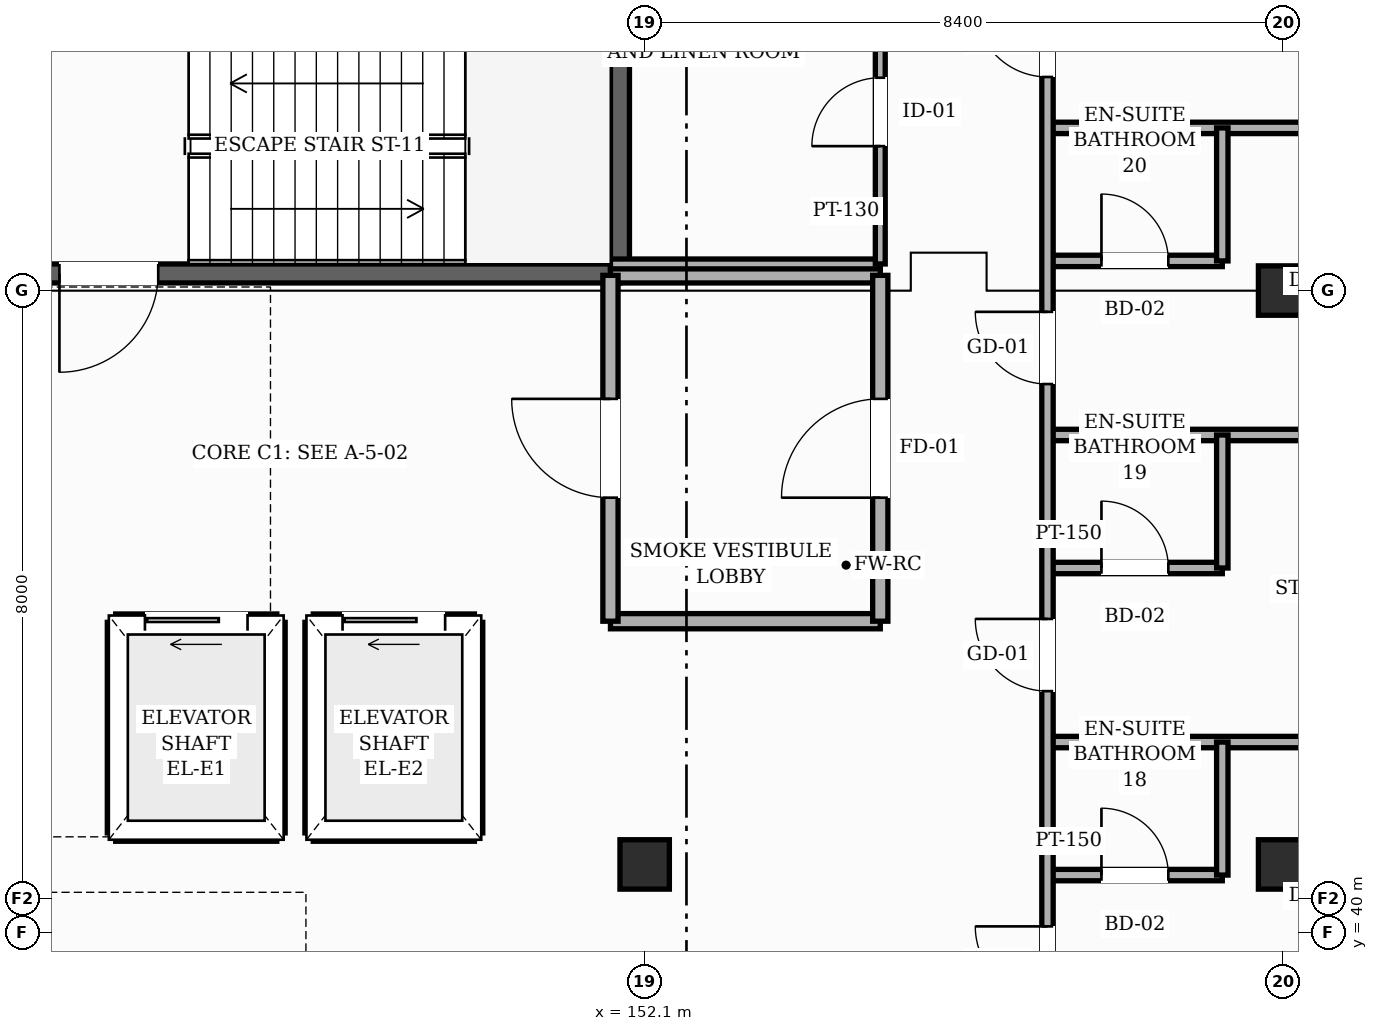
"""IFC4 building model, lengths in metres.
Left out: names, types, materials, properties, quantities, classifications, styles, units other than length and angle.
Written with IfcOpenShell. Run it as: python <this file> out.ifc"""

import sys

from ifc_helpers import new_model, si_unit, direction, frame, frame_2d, origin, origin_2d, place, context, subcontext, project, spatial, rectangle, hollow_rectangle, extrude, element, fill, save


model = new_model("IFC4")
c1 = context("Model", 3, precision=1e-05, world=origin(), true_north=direction((0.0, 1.0)))
c2 = subcontext(c1, "Body", "Model", "MODEL_VIEW")
j1 = project(units=[si_unit("LENGTHUNIT", "METRE"), si_unit("PLANEANGLEUNIT", "RADIAN")], contexts=[c1])
p1 = place(None, origin())
s1 = spatial("IfcSite", under=j1, at=p1, CompositionType="ELEMENT")
p2 = place(p1, origin())
s2 = spatial("IfcBuilding", under=s1, at=p2, CompositionType="ELEMENT")
p3 = place(p2, frame((0.0, 0.0, 15.0)))
s3 = spatial("IfcBuildingStorey", under=s2, at=p3, CompositionType="ELEMENT", Elevation=15.0)
for number, where, z_axis, x_axis in (
    (1, (152.1, 40.9, 0.0), (0.0, 0.0, 1.0), (1.0, 0.0, 0.0)),
    (2, (160.5, 40.9, 0.0), (0.0, 0.0, 1.0), (1.0, 0.0, 0.0)),
    (3, (160.5, 48.45, 0.0), (0.0, 0.0, 1.0), (1.0, 0.0, 0.0)),
):
    element("IfcColumn", number, at=place(p3, frame(where, z_axis=z_axis, x_axis=x_axis)), inside=s3, PredefinedType="COLUMN", context=c2, shape_type="SweptSolid", body=[
        extrude(hollow_rectangle(XDim=0.65, YDim=0.65, WallThickness=0.025, InnerFilletRadius=0.025, OuterFilletRadius=0.05, at=origin_2d()), origin(), (0.0, 0.0, 1.0), 4.8),
    ])
p4 = place(p3, frame((151.775, 52.025, 0.0), z_axis=(0.0, 0.0, 1.0), x_axis=(0.0, -1.0, 0.0)))
e4 = element("IfcWall", 4, at=p4, inside=s3, PredefinedType="SHEAR", context=c2, shape_type="SweptSolid", body=[
    extrude(rectangle(XDim=3.35, YDim=0.25, at=frame_2d((1.675, 0.0))), origin(), (0.0, 0.0, 1.0), 4.56),
])
p5 = place(p3, frame((151.775, 48.675, 0.0), z_axis=(0.0, 0.0, 1.0), x_axis=(-1.0, 0.0, 0.0)))
e5 = element("IfcWall", 5, at=p5, inside=s3, PredefinedType="SHEAR", context=c2, shape_type="SweptSolid", body=[
    extrude(rectangle(XDim=7.9, YDim=0.25, at=frame_2d((3.95, 0.0))), origin(), (0.0, 0.0, 1.0), 4.56),
])
p6 = place(p5, frame((6.075, 0.0, 0.0)))
e6 = element("IfcOpeningElement", 6, at=p6, cuts=e5, PredefinedType="OPENING", context=c2, shape_type="SweptSolid", body=[
    extrude(rectangle(XDim=1.3, YDim=2.2, at=frame_2d((0.65, 1.1))), frame((0.0, 0.135, 0.0), z_axis=(0.0, -1.0, 0.0), x_axis=(1.0, 0.0, 0.0)), (0.0, 0.0, 1.0), 0.27),
])
p7 = place(p3, frame((145.14, 44.085, 0.0), z_axis=(0.0, 0.0, 1.0), x_axis=(1.0, 0.0, 0.0)))
e7 = element("IfcWall", 7, at=p7, inside=s3, PredefinedType="SHEAR", context=c2, shape_type="SweptSolid", body=[
    extrude(rectangle(XDim=2.12, YDim=0.22, at=frame_2d((1.06, 0.0))), origin(), (0.0, 0.0, 1.0), 4.56),
])
p8 = place(p7, frame((0.385, 0.0, 0.0)))
e8 = element("IfcOpeningElement", 8, at=p8, cuts=e7, PredefinedType="OPENING", context=c2, shape_type="SweptSolid", body=[
    extrude(rectangle(XDim=1.35, YDim=2.3, at=frame_2d((0.675, 1.15))), frame((0.0, 0.12, 0.0), z_axis=(0.0, -1.0, 0.0), x_axis=(1.0, 0.0, 0.0)), (0.0, 0.0, 1.0), 0.24),
])
p9 = place(p3, frame((145.14, 41.315, 0.0), z_axis=(0.0, 0.0, 1.0), x_axis=(1.0, 0.0, 0.0)))
e9 = element("IfcWall", 9, at=p9, inside=s3, PredefinedType="SHEAR", context=c2, shape_type="SweptSolid", body=[
    extrude(rectangle(XDim=2.12, YDim=0.22, at=frame_2d((1.06, 0.0))), origin(), (0.0, 0.0, 1.0), 4.56),
])
for number, where, z_axis, x_axis in (
    (10, (147.26, 41.315, 0.0), (0.0, 0.0, 1.0), (0.0, 1.0, 0.0)),
    (11, (145.14, 41.315, 0.0), (0.0, 0.0, 1.0), (0.0, 1.0, 0.0)),
):
    element("IfcWall", number, at=place(p3, frame(where, z_axis=z_axis, x_axis=x_axis)), inside=s3, PredefinedType="SHEAR", context=c2, shape_type="SweptSolid", body=[
        extrude(rectangle(XDim=2.77, YDim=0.22, at=frame_2d((1.385, 0.0))), origin(), (0.0, 0.0, 1.0), 4.56),
    ])
p10 = place(p3, frame((147.74, 44.085, 0.0), z_axis=(0.0, 0.0, 1.0), x_axis=(1.0, 0.0, 0.0)))
e12 = element("IfcWall", 12, at=p10, inside=s3, PredefinedType="SHEAR", context=c2, shape_type="SweptSolid", body=[
    extrude(rectangle(XDim=2.12, YDim=0.22, at=frame_2d((1.06, 0.0))), origin(), (0.0, 0.0, 1.0), 4.56),
])
p11 = place(p10, frame((0.385, 0.0, 0.0)))
e13 = element("IfcOpeningElement", 13, at=p11, cuts=e12, PredefinedType="OPENING", context=c2, shape_type="SweptSolid", body=[
    extrude(rectangle(XDim=1.35, YDim=2.3, at=frame_2d((0.675, 1.15))), frame((0.0, 0.12, 0.0), z_axis=(0.0, -1.0, 0.0), x_axis=(1.0, 0.0, 0.0)), (0.0, 0.0, 1.0), 0.24),
])
p12 = place(p3, frame((147.74, 41.315, 0.0), z_axis=(0.0, 0.0, 1.0), x_axis=(1.0, 0.0, 0.0)))
e14 = element("IfcWall", 14, at=p12, inside=s3, PredefinedType="SHEAR", context=c2, shape_type="SweptSolid", body=[
    extrude(rectangle(XDim=2.12, YDim=0.22, at=frame_2d((1.06, 0.0))), origin(), (0.0, 0.0, 1.0), 4.56),
])
for number, where, z_axis, x_axis in (
    (15, (149.86, 41.315, 0.0), (0.0, 0.0, 1.0), (0.0, 1.0, 0.0)),
    (16, (147.74, 41.315, 0.0), (0.0, 0.0, 1.0), (0.0, 1.0, 0.0)),
):
    element("IfcWall", number, at=place(p3, frame(where, z_axis=z_axis, x_axis=x_axis)), inside=s3, PredefinedType="SHEAR", context=c2, shape_type="SweptSolid", body=[
        extrude(rectangle(XDim=2.77, YDim=0.22, at=frame_2d((1.385, 0.0))), origin(), (0.0, 0.0, 1.0), 4.56),
    ])
p13 = place(p3, frame((157.4, 40.76, 0.0), z_axis=(0.0, 0.0, 1.0), x_axis=(1.0, 0.0, 0.0)))
e17 = element("IfcWall", 17, at=p13, inside=s3, PredefinedType="PARTITIONING", context=c2, shape_type="SweptSolid", body=[
    extrude(rectangle(XDim=2.3, YDim=0.15, at=frame_2d((1.15, 0.0))), origin(), (0.0, 0.0, 1.0), 3.885),
])
p14 = place(p13, frame((0.71, 0.0, 0.0)))
e18 = element("IfcOpeningElement", 18, at=p14, cuts=e17, PredefinedType="OPENING", context=c2, shape_type="SweptSolid", body=[
    extrude(rectangle(XDim=0.88, YDim=2.12, at=frame_2d((0.44, 1.06))), frame((0.0, 0.085, 0.0), z_axis=(0.0, -1.0, 0.0), x_axis=(1.0, 0.0, 0.0)), (0.0, 0.0, 1.0), 0.17),
])
p15 = place(p3, frame((157.4, 42.51, 0.0), z_axis=(0.0, 0.0, 1.0), x_axis=(1.0, 0.0, 0.0)))
e19 = element("IfcWall", 19, at=p15, inside=s3, PredefinedType="PARTITIONING", context=c2, shape_type="SweptSolid", body=[
    extrude(rectangle(XDim=9.8, YDim=0.15, at=frame_2d((4.9, 0.0))), origin(), (0.0, 0.0, 1.0), 4.545),
])
p16 = place(p3, frame((151.65, 44.1, 0.0), z_axis=(0.0, 0.0, 1.0), x_axis=(1.0, 0.0, 0.0)))
e20 = element("IfcWall", 20, at=p16, inside=s3, PredefinedType="SOLIDWALL", context=c2, shape_type="SweptSolid", body=[
    extrude(rectangle(XDim=3.55, YDim=0.2, at=frame_2d((1.775, 0.0))), origin(), (0.0, 0.0, 1.0), 4.545),
])
p17 = place(p3, frame((157.4, 44.8, 0.0), z_axis=(0.0, 0.0, 1.0), x_axis=(1.0, 0.0, 0.0)))
e21 = element("IfcWall", 21, at=p17, inside=s3, PredefinedType="PARTITIONING", context=c2, shape_type="SweptSolid", body=[
    extrude(rectangle(XDim=2.3, YDim=0.15, at=frame_2d((1.15, 0.0))), origin(), (0.0, 0.0, 1.0), 4.545),
])
p18 = place(p17, frame((0.71, 0.0, 0.0)))
e22 = element("IfcOpeningElement", 22, at=p18, cuts=e21, PredefinedType="OPENING", context=c2, shape_type="SweptSolid", body=[
    extrude(rectangle(XDim=0.88, YDim=2.12, at=frame_2d((0.44, 1.06))), frame((0.0, 0.085, 0.0), z_axis=(0.0, -1.0, 0.0), x_axis=(1.0, 0.0, 0.0)), (0.0, 0.0, 1.0), 0.17),
])
p19 = place(p3, frame((157.4, 46.55, 0.0), z_axis=(0.0, 0.0, 1.0), x_axis=(1.0, 0.0, 0.0)))
e23 = element("IfcWall", 23, at=p19, inside=s3, PredefinedType="PARTITIONING", context=c2, shape_type="SweptSolid", body=[
    extrude(rectangle(XDim=9.8, YDim=0.15, at=frame_2d((4.9, 0.0))), origin(), (0.0, 0.0, 1.0), 4.545),
])
p20 = place(p3, frame((151.65, 48.65, 0.0), z_axis=(0.0, 0.0, 1.0), x_axis=(1.0, 0.0, 0.0)))
e24 = element("IfcWall", 24, at=p20, inside=s3, PredefinedType="SOLIDWALL", context=c2, shape_type="SweptSolid", body=[
    extrude(rectangle(XDim=3.55, YDim=0.2, at=frame_2d((1.775, 0.0))), origin(), (0.0, 0.0, 1.0), 4.545),
])
p21 = place(p3, frame((151.65, 48.8, 0.0), z_axis=(0.0, 0.0, 1.0), x_axis=(1.0, 0.0, 0.0)))
e25 = element("IfcWall", 25, at=p21, inside=s3, PredefinedType="PARTITIONING", context=c2, shape_type="SweptSolid", body=[
    extrude(rectangle(XDim=3.55, YDim=0.13, at=frame_2d((1.775, 0.0))), origin(), (0.0, 0.0, 1.0), 4.545),
])
p22 = place(p3, frame((157.4, 48.84, 0.0), z_axis=(0.0, 0.0, 1.0), x_axis=(1.0, 0.0, 0.0)))
e26 = element("IfcWall", 26, at=p22, inside=s3, PredefinedType="PARTITIONING", context=c2, shape_type="SweptSolid", body=[
    extrude(rectangle(XDim=2.3, YDim=0.15, at=frame_2d((1.15, 0.0))), origin(), (0.0, 0.0, 1.0), 4.545),
])
p23 = place(p22, frame((0.71, 0.0, 0.0)))
e27 = element("IfcOpeningElement", 27, at=p23, cuts=e26, PredefinedType="OPENING", context=c2, shape_type="SweptSolid", body=[
    extrude(rectangle(XDim=0.88, YDim=2.12, at=frame_2d((0.44, 1.06))), frame((0.0, 0.085, 0.0), z_axis=(0.0, -1.0, 0.0), x_axis=(1.0, 0.0, 0.0)), (0.0, 0.0, 1.0), 0.17),
])
p24 = place(p3, frame((157.4, 50.59, 0.0), z_axis=(0.0, 0.0, 1.0), x_axis=(1.0, 0.0, 0.0)))
e28 = element("IfcWall", 28, at=p24, inside=s3, PredefinedType="PARTITIONING", context=c2, shape_type="SweptSolid", body=[
    extrude(rectangle(XDim=9.8, YDim=0.15, at=frame_2d((4.9, 0.0))), origin(), (0.0, 0.0, 1.0), 4.545),
])
p25 = place(p3, frame((151.65, 44.1, 0.0), z_axis=(0.0, 0.0, 1.0), x_axis=(0.0, 1.0, 0.0)))
e29 = element("IfcWall", 29, at=p25, inside=s3, PredefinedType="SOLIDWALL", context=c2, shape_type="SweptSolid", body=[
    extrude(rectangle(XDim=4.55, YDim=0.2, at=frame_2d((2.275, 0.0))), origin(), (0.0, 0.0, 1.0), 4.545),
])
p26 = place(p25, frame((1.625, 0.0, 0.0)))
e30 = element("IfcOpeningElement", 30, at=p26, cuts=e29, PredefinedType="OPENING", context=c2, shape_type="SweptSolid", body=[
    extrude(rectangle(XDim=1.3, YDim=2.2, at=frame_2d((0.65, 1.1))), frame((0.0, 0.11, 0.0), z_axis=(0.0, -1.0, 0.0), x_axis=(1.0, 0.0, 0.0)), (0.0, 0.0, 1.0), 0.22),
])
p27 = place(p3, frame((155.2, 44.1, 0.0), z_axis=(0.0, 0.0, 1.0), x_axis=(0.0, 1.0, 0.0)))
e31 = element("IfcWall", 31, at=p27, inside=s3, PredefinedType="SOLIDWALL", context=c2, shape_type="SweptSolid", body=[
    extrude(rectangle(XDim=4.55, YDim=0.2, at=frame_2d((2.275, 0.0))), origin(), (0.0, 0.0, 1.0), 4.545),
])
p28 = place(p27, frame((1.625, 0.0, 0.0)))
e32 = element("IfcOpeningElement", 32, at=p28, cuts=e31, PredefinedType="OPENING", context=c2, shape_type="SweptSolid", body=[
    extrude(rectangle(XDim=1.3, YDim=2.2, at=frame_2d((0.65, 1.1))), frame((0.0, 0.11, 0.0), z_axis=(0.0, -1.0, 0.0), x_axis=(1.0, 0.0, 0.0)), (0.0, 0.0, 1.0), 0.22),
])
p29 = place(p3, frame((155.2, 48.8, 0.0), z_axis=(0.0, 0.0, 1.0), x_axis=(0.0, 1.0, 0.0)))
e33 = element("IfcWall", 33, at=p29, inside=s3, PredefinedType="PARTITIONING", context=c2, shape_type="SweptSolid", body=[
    extrude(rectangle(XDim=4.0, YDim=0.13, at=frame_2d((2.0, 0.0))), origin(), (0.0, 0.0, 1.0), 4.545),
])
p30 = place(p29, frame((1.55, 0.0, 0.0)))
e34 = element("IfcOpeningElement", 34, at=p30, cuts=e33, PredefinedType="OPENING", context=c2, shape_type="SweptSolid", body=[
    extrude(rectangle(XDim=0.9, YDim=2.15, at=frame_2d((0.45, 1.075))), frame((0.0, 0.075, 0.0), z_axis=(0.0, -1.0, 0.0), x_axis=(1.0, 0.0, 0.0)), (0.0, 0.0, 1.0), 0.15),
])
p31 = place(p3, frame((157.4, 22.3, 0.0), z_axis=(0.0, 0.0, 1.0), x_axis=(0.0, 1.0, 0.0)))
e35 = element("IfcWall", 35, at=p31, inside=s3, PredefinedType="PARTITIONING", context=c2, shape_type="SweptSolid", body=[
    extrude(rectangle(XDim=48.5, YDim=0.15, at=frame_2d((24.25, 0.0))), origin(), (0.0, 0.0, 1.0), 4.545),
])
p32 = place(p31, frame((0.67, 0.0, 0.0)))
e36 = element("IfcOpeningElement", 36, at=p32, cuts=e35, PredefinedType="OPENING", context=c2, shape_type="SweptSolid", body=[
    extrude(rectangle(XDim=0.95, YDim=2.15, at=frame_2d((0.475, 1.075))), frame((0.0, 0.085, 0.0), z_axis=(0.0, -1.0, 0.0), x_axis=(1.0, 0.0, 0.0)), (0.0, 0.0, 1.0), 0.17),
])
p33 = place(p31, frame((4.71, 0.0, 0.0)))
e37 = element("IfcOpeningElement", 37, at=p33, cuts=e35, PredefinedType="OPENING", context=c2, shape_type="SweptSolid", body=[
    extrude(rectangle(XDim=0.95, YDim=2.15, at=frame_2d((0.475, 1.075))), frame((0.0, 0.085, 0.0), z_axis=(0.0, -1.0, 0.0), x_axis=(1.0, 0.0, 0.0)), (0.0, 0.0, 1.0), 0.17),
])
p34 = place(p31, frame((8.755, 0.0, 0.0)))
e38 = element("IfcOpeningElement", 38, at=p34, cuts=e35, PredefinedType="OPENING", context=c2, shape_type="SweptSolid", body=[
    extrude(rectangle(XDim=0.95, YDim=2.15, at=frame_2d((0.475, 1.075))), frame((0.0, 0.085, 0.0), z_axis=(0.0, -1.0, 0.0), x_axis=(1.0, 0.0, 0.0)), (0.0, 0.0, 1.0), 0.17),
])
p35 = place(p31, frame((12.795, 0.0, 0.0)))
e39 = element("IfcOpeningElement", 39, at=p35, cuts=e35, PredefinedType="OPENING", context=c2, shape_type="SweptSolid", body=[
    extrude(rectangle(XDim=0.95, YDim=2.15, at=frame_2d((0.475, 1.075))), frame((0.0, 0.085, 0.0), z_axis=(0.0, -1.0, 0.0), x_axis=(1.0, 0.0, 0.0)), (0.0, 0.0, 1.0), 0.17),
])
p36 = place(p31, frame((16.835, 0.0, 0.0)))
e40 = element("IfcOpeningElement", 40, at=p36, cuts=e35, PredefinedType="OPENING", context=c2, shape_type="SweptSolid", body=[
    extrude(rectangle(XDim=0.95, YDim=2.15, at=frame_2d((0.475, 1.075))), frame((0.0, 0.085, 0.0), z_axis=(0.0, -1.0, 0.0), x_axis=(1.0, 0.0, 0.0)), (0.0, 0.0, 1.0), 0.17),
])
p37 = place(p31, frame((20.88, 0.0, 0.0)))
e41 = element("IfcOpeningElement", 41, at=p37, cuts=e35, PredefinedType="OPENING", context=c2, shape_type="SweptSolid", body=[
    extrude(rectangle(XDim=0.95, YDim=2.15, at=frame_2d((0.475, 1.075))), frame((0.0, 0.085, 0.0), z_axis=(0.0, -1.0, 0.0), x_axis=(1.0, 0.0, 0.0)), (0.0, 0.0, 1.0), 0.17),
])
p38 = place(p31, frame((24.92, 0.0, 0.0)))
e42 = element("IfcOpeningElement", 42, at=p38, cuts=e35, PredefinedType="OPENING", context=c2, shape_type="SweptSolid", body=[
    extrude(rectangle(XDim=0.95, YDim=2.15, at=frame_2d((0.475, 1.075))), frame((0.0, 0.085, 0.0), z_axis=(0.0, -1.0, 0.0), x_axis=(1.0, 0.0, 0.0)), (0.0, 0.0, 1.0), 0.17),
])
p39 = place(p31, frame((28.96, 0.0, 0.0)))
e43 = element("IfcOpeningElement", 43, at=p39, cuts=e35, PredefinedType="OPENING", context=c2, shape_type="SweptSolid", body=[
    extrude(rectangle(XDim=0.95, YDim=2.15, at=frame_2d((0.475, 1.075))), frame((0.0, 0.085, 0.0), z_axis=(0.0, -1.0, 0.0), x_axis=(1.0, 0.0, 0.0)), (0.0, 0.0, 1.0), 0.17),
])
p40 = place(p31, frame((33.005, 0.0, 0.0)))
e44 = element("IfcOpeningElement", 44, at=p40, cuts=e35, PredefinedType="OPENING", context=c2, shape_type="SweptSolid", body=[
    extrude(rectangle(XDim=0.95, YDim=2.15, at=frame_2d((0.475, 1.075))), frame((0.0, 0.085, 0.0), z_axis=(0.0, -1.0, 0.0), x_axis=(1.0, 0.0, 0.0)), (0.0, 0.0, 1.0), 0.17),
])
p41 = place(p31, frame((37.045, 0.0, 0.0)))
e45 = element("IfcOpeningElement", 45, at=p41, cuts=e35, PredefinedType="OPENING", context=c2, shape_type="SweptSolid", body=[
    extrude(rectangle(XDim=0.95, YDim=2.15, at=frame_2d((0.475, 1.075))), frame((0.0, 0.085, 0.0), z_axis=(0.0, -1.0, 0.0), x_axis=(1.0, 0.0, 0.0)), (0.0, 0.0, 1.0), 0.17),
])
p42 = place(p31, frame((41.09, 0.0, 0.0)))
e46 = element("IfcOpeningElement", 46, at=p42, cuts=e35, PredefinedType="OPENING", context=c2, shape_type="SweptSolid", body=[
    extrude(rectangle(XDim=0.95, YDim=2.15, at=frame_2d((0.475, 1.075))), frame((0.0, 0.085, 0.0), z_axis=(0.0, -1.0, 0.0), x_axis=(1.0, 0.0, 0.0)), (0.0, 0.0, 1.0), 0.17),
])
p43 = place(p31, frame((45.13, 0.0, 0.0)))
e47 = element("IfcOpeningElement", 47, at=p43, cuts=e35, PredefinedType="OPENING", context=c2, shape_type="SweptSolid", body=[
    extrude(rectangle(XDim=0.95, YDim=2.15, at=frame_2d((0.475, 1.075))), frame((0.0, 0.085, 0.0), z_axis=(0.0, -1.0, 0.0), x_axis=(1.0, 0.0, 0.0)), (0.0, 0.0, 1.0), 0.17),
])
for number, where, z_axis, x_axis in (
    (48, (159.7, 40.76, 0.0), (0.0, 0.0, 1.0), (0.0, 1.0, 0.0)),
    (49, (159.7, 44.8, 0.0), (0.0, 0.0, 1.0), (0.0, 1.0, 0.0)),
    (50, (159.7, 48.84, 0.0), (0.0, 0.0, 1.0), (0.0, 1.0, 0.0)),
):
    element("IfcWall", number, at=place(p3, frame(where, z_axis=z_axis, x_axis=x_axis)), inside=s3, PredefinedType="PARTITIONING", context=c2, shape_type="SweptSolid", body=[
        extrude(rectangle(XDim=1.75, YDim=0.15, at=frame_2d((0.875, 0.0))), origin(), (0.0, 0.0, 1.0), 4.545),
    ])
p44 = place(p6, origin())
e51 = element("IfcDoor", 51, at=p44, inside=s3, OperationType="SINGLE_SWING_RIGHT", PredefinedType="DOOR", context=c2, shape_type="SweptSolid", body=[
    extrude(rectangle(XDim=1.3, YDim=2.2, at=frame_2d((0.65, 1.1))), frame((0.0, 0.025, 0.0), z_axis=(0.0, -1.0, 0.0), x_axis=(1.0, 0.0, 0.0)), (0.0, 0.0, 1.0), 0.05),
])
fill(e6, e51)
p45 = place(p8, origin())
e52 = element("IfcDoor", 52, at=p45, inside=s3, OperationType="SLIDING_TO_LEFT", PredefinedType="DOOR", context=c2, shape_type="SweptSolid", body=[
    extrude(rectangle(XDim=1.35, YDim=2.3, at=frame_2d((0.675, 1.15))), frame((0.0, 0.025, 0.0), z_axis=(0.0, -1.0, 0.0), x_axis=(1.0, 0.0, 0.0)), (0.0, 0.0, 1.0), 0.05),
])
fill(e8, e52)
p46 = place(p11, origin())
e53 = element("IfcDoor", 53, at=p46, inside=s3, OperationType="SLIDING_TO_LEFT", PredefinedType="DOOR", context=c2, shape_type="SweptSolid", body=[
    extrude(rectangle(XDim=1.35, YDim=2.3, at=frame_2d((0.675, 1.15))), frame((0.0, 0.025, 0.0), z_axis=(0.0, -1.0, 0.0), x_axis=(1.0, 0.0, 0.0)), (0.0, 0.0, 1.0), 0.05),
])
fill(e13, e53)
p47 = place(p26, origin())
e54 = element("IfcDoor", 54, at=p47, inside=s3, OperationType="SINGLE_SWING_RIGHT", PredefinedType="DOOR", context=c2, shape_type="SweptSolid", body=[
    extrude(rectangle(XDim=1.3, YDim=2.2, at=frame_2d((0.65, 1.1))), frame((0.0, 0.025, 0.0), z_axis=(0.0, -1.0, 0.0), x_axis=(1.0, 0.0, 0.0)), (0.0, 0.0, 1.0), 0.05),
])
fill(e30, e54)
p48 = place(p28, origin())
e55 = element("IfcDoor", 55, at=p48, inside=s3, OperationType="SINGLE_SWING_LEFT", PredefinedType="DOOR", context=c2, shape_type="SweptSolid", body=[
    extrude(rectangle(XDim=1.3, YDim=2.2, at=frame_2d((0.65, 1.1))), frame((0.0, 0.025, 0.0), z_axis=(0.0, -1.0, 0.0), x_axis=(1.0, 0.0, 0.0)), (0.0, 0.0, 1.0), 0.05),
])
fill(e32, e55)
p49 = place(p30, origin())
e56 = element("IfcDoor", 56, at=p49, inside=s3, OperationType="SINGLE_SWING_LEFT", PredefinedType="DOOR", context=c2, shape_type="SweptSolid", body=[
    extrude(rectangle(XDim=0.9, YDim=2.15, at=frame_2d((0.45, 1.075))), frame((0.0, 0.025, 0.0), z_axis=(0.0, -1.0, 0.0), x_axis=(1.0, 0.0, 0.0)), (0.0, 0.0, 1.0), 0.05),
])
fill(e34, e56)
p50 = place(p36, origin())
e57 = element("IfcDoor", 57, at=p50, inside=s3, OperationType="SINGLE_SWING_RIGHT", PredefinedType="DOOR", context=c2, shape_type="SweptSolid", body=[
    extrude(rectangle(XDim=0.95, YDim=2.15, at=frame_2d((0.475, 1.075))), frame((0.0, 0.025, 0.0), z_axis=(0.0, -1.0, 0.0), x_axis=(1.0, 0.0, 0.0)), (0.0, 0.0, 1.0), 0.05),
])
fill(e40, e57)
p51 = place(p14, origin())
e58 = element("IfcDoor", 58, at=p51, inside=s3, OperationType="SINGLE_SWING_LEFT", PredefinedType="DOOR", context=c2, shape_type="SweptSolid", body=[
    extrude(rectangle(XDim=0.88, YDim=2.12, at=frame_2d((0.44, 1.06))), frame((0.0, 0.025, 0.0), z_axis=(0.0, -1.0, 0.0), x_axis=(1.0, 0.0, 0.0)), (0.0, 0.0, 1.0), 0.05),
])
fill(e18, e58)
p52 = place(p37, origin())
e59 = element("IfcDoor", 59, at=p52, inside=s3, OperationType="SINGLE_SWING_RIGHT", PredefinedType="DOOR", context=c2, shape_type="SweptSolid", body=[
    extrude(rectangle(XDim=0.95, YDim=2.15, at=frame_2d((0.475, 1.075))), frame((0.0, 0.025, 0.0), z_axis=(0.0, -1.0, 0.0), x_axis=(1.0, 0.0, 0.0)), (0.0, 0.0, 1.0), 0.05),
])
fill(e41, e59)
p53 = place(p18, origin())
e60 = element("IfcDoor", 60, at=p53, inside=s3, OperationType="SINGLE_SWING_LEFT", PredefinedType="DOOR", context=c2, shape_type="SweptSolid", body=[
    extrude(rectangle(XDim=0.88, YDim=2.12, at=frame_2d((0.44, 1.06))), frame((0.0, 0.025, 0.0), z_axis=(0.0, -1.0, 0.0), x_axis=(1.0, 0.0, 0.0)), (0.0, 0.0, 1.0), 0.05),
])
fill(e22, e60)
p54 = place(p38, origin())
e61 = element("IfcDoor", 61, at=p54, inside=s3, OperationType="SINGLE_SWING_RIGHT", PredefinedType="DOOR", context=c2, shape_type="SweptSolid", body=[
    extrude(rectangle(XDim=0.95, YDim=2.15, at=frame_2d((0.475, 1.075))), frame((0.0, 0.025, 0.0), z_axis=(0.0, -1.0, 0.0), x_axis=(1.0, 0.0, 0.0)), (0.0, 0.0, 1.0), 0.05),
])
fill(e42, e61)
p55 = place(p23, origin())
e62 = element("IfcDoor", 62, at=p55, inside=s3, OperationType="SINGLE_SWING_LEFT", PredefinedType="DOOR", context=c2, shape_type="SweptSolid", body=[
    extrude(rectangle(XDim=0.88, YDim=2.12, at=frame_2d((0.44, 1.06))), frame((0.0, 0.025, 0.0), z_axis=(0.0, -1.0, 0.0), x_axis=(1.0, 0.0, 0.0)), (0.0, 0.0, 1.0), 0.05),
])
fill(e27, e62)
p56 = place(p39, origin())
e63 = element("IfcDoor", 63, at=p56, inside=s3, OperationType="SINGLE_SWING_RIGHT", PredefinedType="DOOR", context=c2, shape_type="SweptSolid", body=[
    extrude(rectangle(XDim=0.95, YDim=2.15, at=frame_2d((0.475, 1.075))), frame((0.0, 0.025, 0.0), z_axis=(0.0, -1.0, 0.0), x_axis=(1.0, 0.0, 0.0)), (0.0, 0.0, 1.0), 0.05),
])
fill(e43, e63)
save(model, sys.argv[1])
